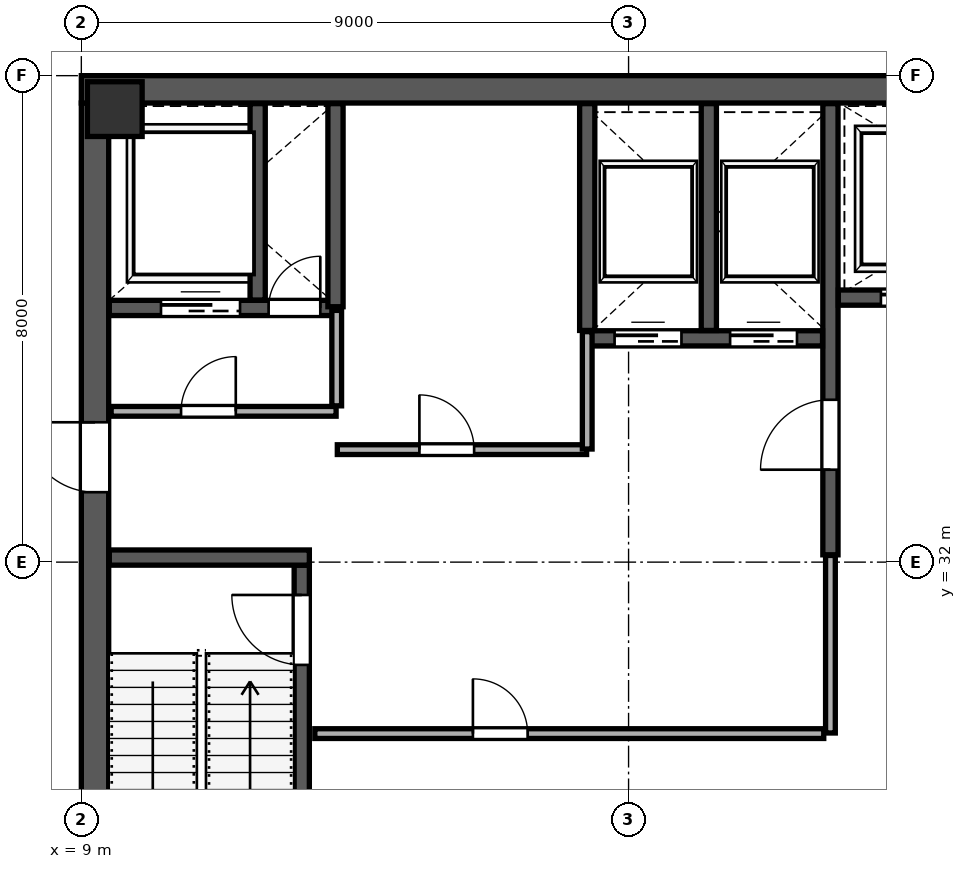
"""IFC4 building model, lengths in metres.
Left out: names, types, materials, properties, quantities, classifications, styles, units other than length and angle.
Written with IfcOpenShell. Run it as: python <this file> out.ifc"""

import sys

from ifc_helpers import new_model, si_unit, direction, frame, frame_2d, origin, origin_2d, place, context, subcontext, project, spatial, rectangle, extrude, source, transform, mapped, element, fill, save


model = new_model("IFC4")
c1 = context("Model", 3, precision=1e-05, world=origin(), true_north=direction((0.0, 1.0)))
c2 = subcontext(c1, "Body", "Model", "MODEL_VIEW")
j1 = project(units=[si_unit("LENGTHUNIT", "METRE"), si_unit("PLANEANGLEUNIT", "RADIAN")], contexts=[c1])
p1 = place(None, origin())
s1 = spatial("IfcSite", under=j1, at=p1, CompositionType="ELEMENT")
p2 = place(p1, origin())
s2 = spatial("IfcBuilding", under=s1, at=p2, CompositionType="ELEMENT")
p3 = place(p2, frame((0.0, 0.0, 258.4)))
s3 = spatial("IfcBuildingStorey", under=s2, at=p3, CompositionType="ELEMENT", Elevation=258.4)
m1 = source(origin(), c2, "Body", "SweptSolid", [
    extrude(rectangle(XDim=0.9, YDim=0.9, at=origin_2d()), origin(), (0.0, 0.0, 1.0), 4.199),
])
p4 = place(p3, frame((9.55, 39.45, 0.001), z_axis=(0.0, 0.0, 1.0), x_axis=(1.0, 0.0, 0.0)))
e1 = element("IfcColumn", 1, at=p4, inside=s3, PredefinedType="COLUMN", context=c2, shape_type="MappedRepresentation", body=[
    mapped(m1, transform((0.0, 0.0, 0.0), scale=1.0)),
])
p5 = place(p3, frame((9.225, 24.45, 0.0), z_axis=(0.0, 0.0, 1.0), x_axis=(0.0, 1.0, 0.0)))
e2 = element("IfcWall", 2, at=p5, inside=s3, PredefinedType="SHEAR", context=c2, shape_type="SweptSolid", body=[
    extrude(rectangle(XDim=15.1, YDim=0.45, at=frame_2d((7.55, 0.0))), origin(), (0.0, 0.0, 1.0), 3.96),
])
p6 = place(p5, frame((8.7, 0.0, 0.0)))
e3 = element("IfcOpeningElement", 3, at=p6, cuts=e2, PredefinedType="OPENING", context=c2, shape_type="SweptSolid", body=[
    extrude(rectangle(XDim=1.15, YDim=2.2, at=frame_2d((0.575, 1.1))), frame((0.0, 0.235, 0.0), z_axis=(0.0, -1.0, 0.0), x_axis=(1.0, 0.0, 0.0)), (0.0, 0.0, 1.0), 0.47),
])
p7 = place(p3, frame((9.0, 39.775, 0.0), z_axis=(0.0, 0.0, 1.0), x_axis=(1.0, 0.0, 0.0)))
e4 = element("IfcWall", 4, at=p7, inside=s3, PredefinedType="SHEAR", context=c2, shape_type="SweptSolid", body=[
    extrude(rectangle(XDim=18.0, YDim=0.45, at=frame_2d((9.0, 0.0))), origin(), (0.0, 0.0, 1.0), 3.96),
])
p8 = place(p3, frame((12.625, 24.46, 0.0), z_axis=(0.0, 0.0, 1.0), x_axis=(0.0, 1.0, 0.0)))
e5 = element("IfcWall", 5, at=p8, inside=s3, PredefinedType="SHEAR", context=c2, shape_type="SweptSolid", body=[
    extrude(rectangle(XDim=7.49, YDim=0.25, at=frame_2d((3.745, 0.0))), origin(), (0.0, 0.0, 1.0), 3.96),
])
p9 = place(p8, frame((5.85, 0.0, 0.0)))
e6 = element("IfcOpeningElement", 6, at=p9, cuts=e5, PredefinedType="OPENING", context=c2, shape_type="SweptSolid", body=[
    extrude(rectangle(XDim=1.15, YDim=2.2, at=frame_2d((0.575, 1.1))), frame((0.0, 0.135, 0.0), z_axis=(0.0, -1.0, 0.0), x_axis=(1.0, 0.0, 0.0)), (0.0, 0.0, 1.0), 0.27),
])
p10 = place(p3, frame((9.46, 32.075, 0.0), z_axis=(0.0, 0.0, 1.0), x_axis=(1.0, 0.0, 0.0)))
e7 = element("IfcWall", 7, at=p10, inside=s3, PredefinedType="SHEAR", context=c2, shape_type="SweptSolid", body=[
    extrude(rectangle(XDim=3.29, YDim=0.25, at=frame_2d((1.645, 0.0))), origin(), (0.0, 0.0, 1.0), 3.96),
])
p11 = place(p3, frame((21.32, 32.12, 0.0), z_axis=(0.0, 0.0, 1.0), x_axis=(0.0, 1.0, 0.0)))
e8 = element("IfcWall", 8, at=p11, inside=s3, PredefinedType="SHEAR", context=c2, shape_type="SweptSolid", body=[
    extrude(rectangle(XDim=7.42, YDim=0.25, at=frame_2d((3.71, 0.0))), origin(), (0.0, 0.0, 1.0), 3.96),
])
p12 = place(p11, frame((1.4, 0.0, 0.0)))
e9 = element("IfcOpeningElement", 9, at=p12, cuts=e8, PredefinedType="OPENING", context=c2, shape_type="SweptSolid", body=[
    extrude(rectangle(XDim=1.15, YDim=2.2, at=frame_2d((0.575, 1.1))), frame((0.0, 0.135, 0.0), z_axis=(0.0, -1.0, 0.0), x_axis=(1.0, 0.0, 0.0)), (0.0, 0.0, 1.0), 0.27),
])
p13 = place(p3, frame((9.46, 36.18, 0.0), z_axis=(0.0, 0.0, 1.0), x_axis=(1.0, 0.0, 0.0)))
e10 = element("IfcWall", 10, at=p13, inside=s3, PredefinedType="SHEAR", context=c2, shape_type="SweptSolid", body=[
    extrude(rectangle(XDim=3.79, YDim=0.25, at=frame_2d((1.895, 0.0))), origin(), (0.0, 0.0, 1.0), 3.96),
])
p14 = place(p13, frame((2.62, 0.0, 0.0)))
e11 = element("IfcOpeningElement", 11, at=p14, cuts=e10, PredefinedType="OPENING", context=c2, shape_type="SweptSolid", body=[
    extrude(rectangle(XDim=0.85, YDim=2.1, at=frame_2d((0.425, 1.05))), frame((0.0, 0.135, 0.0), z_axis=(0.0, -1.0, 0.0), x_axis=(1.0, 0.0, 0.0)), (0.0, 0.0, 1.0), 0.27),
])
p15 = place(p13, frame((0.85, 0.0, 0.0)))
e12 = element("IfcOpeningElement", 12, at=p15, cuts=e10, PredefinedType="OPENING", context=c2, shape_type="SweptSolid", body=[
    extrude(rectangle(XDim=1.3, YDim=2.25, at=frame_2d((0.65, 1.125))), frame((0.0, 0.135, 0.0), z_axis=(0.0, -1.0, 0.0), x_axis=(1.0, 0.0, 0.0)), (0.0, 0.0, 1.0), 0.27),
])
p16 = place(p3, frame((11.9, 36.31, 0.0), z_axis=(0.0, 0.0, 1.0), x_axis=(0.0, 1.0, 0.0)))
e13 = element("IfcWall", 13, at=p16, inside=s3, PredefinedType="SHEAR", context=c2, shape_type="SweptSolid", body=[
    extrude(rectangle(XDim=3.23, YDim=0.25, at=frame_2d((1.615, 0.0))), origin(), (0.0, 0.0, 1.0), 3.96),
])
p17 = place(p3, frame((21.45, 36.35, 0.0), z_axis=(0.0, 0.0, 1.0), x_axis=(1.0, 0.0, 0.0)))
e14 = element("IfcWall", 14, at=p17, inside=s3, PredefinedType="SHEAR", context=c2, shape_type="SweptSolid", body=[
    extrude(rectangle(XDim=5.09, YDim=0.25, at=frame_2d((2.545, 0.0))), origin(), (0.0, 0.0, 1.0), 3.96),
])
p18 = place(p17, frame((0.7, 0.0, 0.0)))
e15 = element("IfcOpeningElement", 15, at=p18, cuts=e14, PredefinedType="OPENING", context=c2, shape_type="SweptSolid", body=[
    extrude(rectangle(XDim=1.2, YDim=2.2, at=frame_2d((0.6, 1.1))), frame((0.0, 0.135, 0.0), z_axis=(0.0, -1.0, 0.0), x_axis=(1.0, 0.0, 0.0)), (0.0, 0.0, 1.0), 0.27),
])
p19 = place(p17, frame((3.25, 0.0, 0.0)))
e16 = element("IfcOpeningElement", 16, at=p19, cuts=e14, PredefinedType="OPENING", context=c2, shape_type="SweptSolid", body=[
    extrude(rectangle(XDim=1.2, YDim=2.2, at=frame_2d((0.6, 1.1))), frame((0.0, 0.135, 0.0), z_axis=(0.0, -1.0, 0.0), x_axis=(1.0, 0.0, 0.0)), (0.0, 0.0, 1.0), 0.27),
])
p20 = place(p3, frame((13.18, 36.2, 0.0), z_axis=(0.0, 0.0, 1.0), x_axis=(0.0, 1.0, 0.0)))
e17 = element("IfcWall", 17, at=p20, inside=s3, PredefinedType="SHEAR", context=c2, shape_type="SweptSolid", body=[
    extrude(rectangle(XDim=3.34, YDim=0.25, at=frame_2d((1.67, 0.0))), origin(), (0.0, 0.0, 1.0), 3.96),
])
p21 = place(p3, frame((17.32, 35.68, 0.0), z_axis=(0.0, 0.0, 1.0), x_axis=(1.0, 0.0, 0.0)))
e18 = element("IfcWall", 18, at=p21, inside=s3, PredefinedType="SHEAR", context=c2, shape_type="SweptSolid", body=[
    extrude(rectangle(XDim=3.87, YDim=0.25, at=frame_2d((1.935, 0.0))), origin(), (0.0, 0.0, 1.0), 3.96),
])
p22 = place(p21, frame((0.45, 0.0, 0.0)))
e19 = element("IfcOpeningElement", 19, at=p22, cuts=e18, PredefinedType="OPENING", context=c2, shape_type="SweptSolid", body=[
    extrude(rectangle(XDim=1.1, YDim=2.2, at=frame_2d((0.55, 1.1))), frame((0.0, 0.135, 0.0), z_axis=(0.0, -1.0, 0.0), x_axis=(1.0, 0.0, 0.0)), (0.0, 0.0, 1.0), 0.27),
])
p23 = place(p21, frame((2.35, 0.0, 0.0)))
e20 = element("IfcOpeningElement", 20, at=p23, cuts=e18, PredefinedType="OPENING", context=c2, shape_type="SweptSolid", body=[
    extrude(rectangle(XDim=1.1, YDim=2.2, at=frame_2d((0.55, 1.1))), frame((0.0, 0.135, 0.0), z_axis=(0.0, -1.0, 0.0), x_axis=(1.0, 0.0, 0.0)), (0.0, 0.0, 1.0), 0.27),
])
for number, where, z_axis, x_axis in (
    (21, (17.32, 35.81, 0.0), (0.0, 0.0, 1.0), (0.0, 1.0, 0.0)),
    (22, (19.32, 35.81, 0.0), (0.0, 0.0, 1.0), (0.0, 1.0, 0.0)),
):
    element("IfcWall", number, at=place(p3, frame(where, z_axis=z_axis, x_axis=x_axis)), inside=s3, PredefinedType="SHEAR", context=c2, shape_type="SweptSolid", body=[
        extrude(rectangle(XDim=3.73, YDim=0.25, at=frame_2d((1.865, 0.0))), origin(), (0.0, 0.0, 1.0), 3.96),
    ])
p24 = place(p3, frame((9.49, 34.48, 0.0), z_axis=(0.0, 0.0, 1.0), x_axis=(1.0, 0.0, 0.0)))
e23 = element("IfcWall", 23, at=p24, inside=s3, PredefinedType="PARTITIONING", context=c2, shape_type="SweptSolid", body=[
    extrude(rectangle(XDim=3.7, YDim=0.16, at=frame_2d((1.85, 0.0))), origin(), (0.0, 0.0, 1.0), 3.96),
])
p25 = place(p24, frame((1.15, 0.0, 0.0)))
e24 = element("IfcOpeningElement", 24, at=p25, cuts=e23, PredefinedType="OPENING", context=c2, shape_type="SweptSolid", body=[
    extrude(rectangle(XDim=0.9, YDim=2.15, at=frame_2d((0.45, 1.075))), frame((0.0, 0.09, 0.0), z_axis=(0.0, -1.0, 0.0), x_axis=(1.0, 0.0, 0.0)), (0.0, 0.0, 1.0), 0.18),
])
p26 = place(p3, frame((13.2, 34.57, 0.0), z_axis=(0.0, 0.0, 1.0), x_axis=(0.0, 1.0, 0.0)))
e25 = element("IfcWall", 25, at=p26, inside=s3, PredefinedType="PARTITIONING", context=c2, shape_type="SweptSolid", body=[
    extrude(rectangle(XDim=1.57, YDim=0.16, at=frame_2d((0.785, 0.0))), origin(), (0.0, 0.0, 1.0), 3.96),
])
p27 = place(p3, frame((13.21, 33.85, 0.0), z_axis=(0.0, 0.0, 1.0), x_axis=(1.0, 0.0, 0.0)))
e26 = element("IfcWall", 26, at=p27, inside=s3, PredefinedType="PARTITIONING", context=c2, shape_type="SweptSolid", body=[
    extrude(rectangle(XDim=4.1, YDim=0.16, at=frame_2d((2.05, 0.0))), origin(), (0.0, 0.0, 1.0), 3.96),
])
p28 = place(p27, frame((1.35, 0.0, 0.0)))
e27 = element("IfcOpeningElement", 27, at=p28, cuts=e26, PredefinedType="OPENING", context=c2, shape_type="SweptSolid", body=[
    extrude(rectangle(XDim=0.9, YDim=2.15, at=frame_2d((0.45, 1.075))), frame((0.0, 0.09, 0.0), z_axis=(0.0, -1.0, 0.0), x_axis=(1.0, 0.0, 0.0)), (0.0, 0.0, 1.0), 0.18),
])
p29 = place(p3, frame((17.32, 33.86, 0.0), z_axis=(0.0, 0.0, 1.0), x_axis=(0.0, 1.0, 0.0)))
e28 = element("IfcWall", 28, at=p29, inside=s3, PredefinedType="PARTITIONING", context=c2, shape_type="SweptSolid", body=[
    extrude(rectangle(XDim=1.93, YDim=0.16, at=frame_2d((0.965, 0.0))), origin(), (0.0, 0.0, 1.0), 3.96),
])
p30 = place(p3, frame((12.84, 29.18, 0.0), z_axis=(0.0, 0.0, 1.0), x_axis=(1.0, 0.0, 0.0)))
e29 = element("IfcWall", 29, at=p30, inside=s3, PredefinedType="PARTITIONING", context=c2, shape_type="SweptSolid", body=[
    extrude(rectangle(XDim=8.37, YDim=0.16, at=frame_2d((4.185, 0.0))), origin(), (0.0, 0.0, 1.0), 3.96),
])
p31 = place(p30, frame((2.6, 0.0, 0.0)))
e30 = element("IfcOpeningElement", 30, at=p31, cuts=e29, PredefinedType="OPENING", context=c2, shape_type="SweptSolid", body=[
    extrude(rectangle(XDim=0.9, YDim=2.15, at=frame_2d((0.45, 1.075))), frame((0.0, 0.09, 0.0), z_axis=(0.0, -1.0, 0.0), x_axis=(1.0, 0.0, 0.0)), (0.0, 0.0, 1.0), 0.18),
])
p32 = place(p3, frame((21.32, 29.19, 0.0), z_axis=(0.0, 0.0, 1.0), x_axis=(0.0, 1.0, 0.0)))
e31 = element("IfcWall", 31, at=p32, inside=s3, PredefinedType="PARTITIONING", context=c2, shape_type="SweptSolid", body=[
    extrude(rectangle(XDim=2.92, YDim=0.16, at=frame_2d((1.46, 0.0))), origin(), (0.0, 0.0, 1.0), 3.96),
])
p33 = place(p3, frame((4.203, 28.778, 0.0), z_axis=(0.0, 0.0, 1.0), x_axis=(0.675591041558, -0.737276572642, 0.0)))
e32 = element("IfcWall", 32, at=p33, inside=s3, PredefinedType="PARTITIONING", context=c2, shape_type="SweptSolid", body=[
    extrude(rectangle(XDim=14.07, YDim=0.16, at=frame_2d((7.035, 0.0))), origin(), (0.0, 0.0, 1.0), 3.96),
])
p34 = place(p33, frame((1.15, 0.0, 0.0)))
e33 = element("IfcOpeningElement", 33, at=p34, cuts=e32, PredefinedType="OPENING", context=c2, shape_type="SweptSolid", body=[
    extrude(rectangle(XDim=0.95, YDim=2.15, at=frame_2d((0.475, 1.075))), frame((0.0, 0.09, 0.0), z_axis=(0.0, -1.0, 0.0), x_axis=(1.0, 0.0, 0.0)), (0.0, 0.0, 1.0), 0.18),
])
p35 = place(p3, frame((19.042, 50.92, 0.0), z_axis=(0.0, 0.0, 1.0), x_axis=(0.675589646996, -0.737277850523, 0.0)))
e34 = element("IfcWall", 34, at=p35, inside=s3, PredefinedType="PARTITIONING", context=c2, shape_type="SweptSolid", body=[
    extrude(rectangle(XDim=21.87, YDim=0.135, at=frame_2d((10.935, 0.0))), origin(), (0.0, 0.0, 1.0), 3.96),
])
p36 = place(p35, frame((5.4, 0.0, 0.0)))
e35 = element("IfcOpeningElement", 35, at=p36, cuts=e34, PredefinedType="OPENING", context=c2, shape_type="SweptSolid", body=[
    extrude(rectangle(XDim=0.95, YDim=2.15, at=frame_2d((0.475, 1.075))), frame((0.0, 0.078, 0.0), z_axis=(0.0, -1.0, 0.0), x_axis=(1.0, 0.0, 0.0)), (0.0, 0.0, 1.0), 0.155),
])
p37 = place(p35, frame((9.4, 0.0, 0.0)))
e36 = element("IfcOpeningElement", 36, at=p37, cuts=e34, PredefinedType="OPENING", context=c2, shape_type="SweptSolid", body=[
    extrude(rectangle(XDim=0.95, YDim=2.15, at=frame_2d((0.475, 1.075))), frame((0.0, 0.078, 0.0), z_axis=(0.0, -1.0, 0.0), x_axis=(1.0, 0.0, 0.0)), (0.0, 0.0, 1.0), 0.155),
])
p38 = place(p3, frame((1.393, 34.124, 0.0), z_axis=(0.0, 0.0, 1.0), x_axis=(0.737274323436, 0.675593496121, 0.0)))
e37 = element("IfcWall", 37, at=p38, inside=s3, PredefinedType="PARTITIONING", context=c2, shape_type="SweptSolid", body=[
    extrude(rectangle(XDim=27.402, YDim=0.135, at=frame_2d((13.701, 0.0))), origin(), (0.0, 0.0, 1.0), 3.96),
])
m2 = source(origin(), c2, "Body", "SweptSolid", [
    extrude(rectangle(XDim=1.15, YDim=2.2, at=frame_2d((0.575, 1.1))), frame((0.0, 0.025, 0.0), z_axis=(0.0, -1.0, 0.0), x_axis=(1.0, 0.0, 0.0)), (0.0, 0.0, 1.0), 0.05),
])
p39 = place(p9, origin())
e38 = element("IfcDoor", 38, at=p39, inside=s3, OperationType="SINGLE_SWING_RIGHT", PredefinedType="DOOR", context=c2, shape_type="MappedRepresentation", body=[
    mapped(m2, transform((0.0, 0.0, 0.0), scale=1.0)),
])
fill(e6, e38)
m3 = source(origin(), c2, "Body", "SweptSolid", [
    extrude(rectangle(XDim=1.15, YDim=2.2, at=frame_2d((0.575, 1.1))), frame((0.0, 0.025, 0.0), z_axis=(0.0, -1.0, 0.0), x_axis=(1.0, 0.0, 0.0)), (0.0, 0.0, 1.0), 0.05),
])
p40 = place(p12, origin())
e39 = element("IfcDoor", 39, at=p40, inside=s3, OperationType="SINGLE_SWING_LEFT", PredefinedType="DOOR", context=c2, shape_type="MappedRepresentation", body=[
    mapped(m3, transform((0.0, 0.0, 0.0), scale=1.0)),
])
fill(e9, e39)
p41 = place(p6, origin())
e40 = element("IfcDoor", 40, at=p41, inside=s3, OperationType="SINGLE_SWING_RIGHT", PredefinedType="DOOR", context=c2, shape_type="MappedRepresentation", body=[
    mapped(m3, transform((0.0, 0.0, 0.0), scale=1.0)),
])
fill(e3, e40)
m4 = source(origin(), c2, "Body", "SweptSolid", [
    extrude(rectangle(XDim=0.85, YDim=2.1, at=frame_2d((0.425, 1.05))), frame((0.0, 0.025, 0.0), z_axis=(0.0, -1.0, 0.0), x_axis=(1.0, 0.0, 0.0)), (0.0, 0.0, 1.0), 0.05),
])
p42 = place(p14, origin())
e41 = element("IfcDoor", 41, at=p42, inside=s3, OperationType="SINGLE_SWING_RIGHT", PredefinedType="DOOR", context=c2, shape_type="MappedRepresentation", body=[
    mapped(m4, transform((0.0, 0.0, 0.0), scale=1.0)),
])
fill(e11, e41)
m5 = source(origin(), c2, "Body", "SweptSolid", [
    extrude(rectangle(XDim=1.1, YDim=2.2, at=frame_2d((0.55, 1.1))), frame((0.0, 0.025, 0.0), z_axis=(0.0, -1.0, 0.0), x_axis=(1.0, 0.0, 0.0)), (0.0, 0.0, 1.0), 0.05),
])
p43 = place(p22, origin())
e42 = element("IfcDoor", 42, at=p43, inside=s3, OperationType="SLIDING_TO_LEFT", PredefinedType="DOOR", context=c2, shape_type="MappedRepresentation", body=[
    mapped(m5, transform((0.0, 0.0, 0.0), scale=1.0)),
])
fill(e19, e42)
p44 = place(p23, origin())
e43 = element("IfcDoor", 43, at=p44, inside=s3, OperationType="SLIDING_TO_RIGHT", PredefinedType="DOOR", context=c2, shape_type="MappedRepresentation", body=[
    mapped(m5, transform((0.0, 0.0, 0.0), scale=1.0)),
])
fill(e20, e43)
m6 = source(origin(), c2, "Body", "SweptSolid", [
    extrude(rectangle(XDim=1.2, YDim=2.2, at=frame_2d((0.6, 1.1))), frame((0.0, 0.025, 0.0), z_axis=(0.0, -1.0, 0.0), x_axis=(1.0, 0.0, 0.0)), (0.0, 0.0, 1.0), 0.05),
])
p45 = place(p18, origin())
e44 = element("IfcDoor", 44, at=p45, inside=s3, OperationType="SLIDING_TO_LEFT", PredefinedType="DOOR", context=c2, shape_type="MappedRepresentation", body=[
    mapped(m6, transform((0.0, 0.0, 0.0), scale=1.0)),
])
fill(e15, e44)
m7 = source(origin(), c2, "Body", "SweptSolid", [
    extrude(rectangle(XDim=1.3, YDim=2.25, at=frame_2d((0.65, 1.125))), frame((0.0, 0.025, 0.0), z_axis=(0.0, -1.0, 0.0), x_axis=(1.0, 0.0, 0.0)), (0.0, 0.0, 1.0), 0.05),
])
p46 = place(p15, origin())
e45 = element("IfcDoor", 45, at=p46, inside=s3, OperationType="SLIDING_TO_LEFT", PredefinedType="DOOR", context=c2, shape_type="MappedRepresentation", body=[
    mapped(m7, transform((0.0, 0.0, 0.0), scale=1.0)),
])
fill(e12, e45)
m8 = source(origin(), c2, "Body", "SweptSolid", [
    extrude(rectangle(XDim=0.9, YDim=2.15, at=frame_2d((0.45, 1.075))), frame((0.0, 0.025, 0.0), z_axis=(0.0, -1.0, 0.0), x_axis=(1.0, 0.0, 0.0)), (0.0, 0.0, 1.0), 0.05),
])
p47 = place(p25, origin())
e46 = element("IfcDoor", 46, at=p47, inside=s3, OperationType="SINGLE_SWING_RIGHT", PredefinedType="DOOR", context=c2, shape_type="MappedRepresentation", body=[
    mapped(m8, transform((0.0, 0.0, 0.0), scale=1.0)),
])
fill(e24, e46)
p48 = place(p28, origin())
e47 = element("IfcDoor", 47, at=p48, inside=s3, OperationType="SINGLE_SWING_LEFT", PredefinedType="DOOR", context=c2, shape_type="MappedRepresentation", body=[
    mapped(m8, transform((0.0, 0.0, 0.0), scale=1.0)),
])
fill(e27, e47)
p49 = place(p31, origin())
e48 = element("IfcDoor", 48, at=p49, inside=s3, OperationType="SINGLE_SWING_LEFT", PredefinedType="DOOR", context=c2, shape_type="MappedRepresentation", body=[
    mapped(m8, transform((0.0, 0.0, 0.0), scale=1.0)),
])
fill(e30, e48)
save(model, sys.argv[1])
